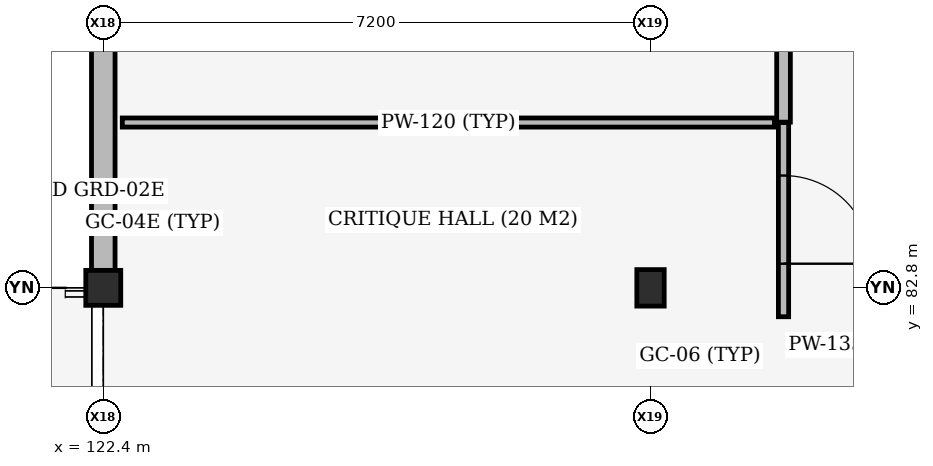
"""IFC4 building model, lengths in metres.
Left out: names, types, materials, properties, quantities, classifications, styles, units other than length and angle.
Written with IfcOpenShell. Run it as: python <this file> out.ifc"""

import sys

from ifc_helpers import new_model, si_unit, direction, frame, frame_2d, origin, origin_2d, place, context, subcontext, project, spatial, rectangle, extrude, element, fill, save


model = new_model("IFC4")
c1 = context("Model", 3, precision=1e-05, world=origin(), true_north=direction((0.0, 1.0)))
c2 = subcontext(c1, "Body", "Model", "MODEL_VIEW")
j1 = project(units=[si_unit("LENGTHUNIT", "METRE"), si_unit("PLANEANGLEUNIT", "RADIAN")], contexts=[c1])
p1 = place(None, origin())
s1 = spatial("IfcSite", under=j1, at=p1, CompositionType="ELEMENT")
p2 = place(p1, origin())
s2 = spatial("IfcBuilding", under=s1, at=p2, CompositionType="ELEMENT")
p3 = place(p2, frame((0.0, 0.0, 9.6)))
s3 = spatial("IfcBuildingStorey", under=s2, at=p3, CompositionType="ELEMENT", Elevation=9.6)
p4 = place(p3, frame((122.4, 82.8, 0.0), z_axis=(0.0, 0.0, 1.0), x_axis=(1.0, 0.0, 0.0)))
e1 = element("IfcColumn", 1, at=p4, inside=s3, PredefinedType="COLUMN", context=c2, shape_type="SweptSolid", body=[
    extrude(rectangle(XDim=0.46, YDim=0.46, at=origin_2d()), origin(), (0.0, 0.0, 1.0), 3.92),
])
p5 = place(p3, frame((129.6, 82.8, 0.0), z_axis=(0.0, 0.0, 1.0), x_axis=(1.0, 0.0, 0.0)))
e2 = element("IfcColumn", 2, at=p5, inside=s3, PredefinedType="COLUMN", context=c2, shape_type="SweptSolid", body=[
    extrude(rectangle(XDim=0.36, YDim=0.48, at=origin_2d()), origin(), (0.0, 0.0, 1.0), 3.92),
])
p6 = place(p3, frame((122.4, 83.022, 0.0), z_axis=(0.0, 0.0, 1.0), x_axis=(0.0, 1.0, 0.0)))
e3 = element("IfcWall", 3, at=p6, inside=s3, PredefinedType="STANDARD", context=c2, shape_type="SweptSolid", body=[
    extrude(rectangle(XDim=3.136, YDim=0.31, at=frame_2d((1.568, 0.0))), origin(), (0.0, 0.0, 1.0), 3.4),
])
p7 = place(p3, frame((131.35, 82.42, 0.0), z_axis=(0.0, 0.0, 1.0), x_axis=(0.0, 1.0, 0.0)))
e4 = element("IfcWall", 4, at=p7, inside=s3, PredefinedType="PARTITIONING", context=c2, shape_type="SweptSolid", body=[
    extrude(rectangle(XDim=2.555, YDim=0.135, at=frame_2d((1.278, 0.0))), origin(), (0.0, 0.0, 1.0), 3.34),
])
p8 = place(p7, frame((0.698, 0.0, 0.0)))
e5 = element("IfcOpeningElement", 5, at=p8, cuts=e4, PredefinedType="OPENING", context=c2, shape_type="SweptSolid", body=[
    extrude(rectangle(XDim=1.16, YDim=2.2, at=frame_2d((0.58, 1.1))), frame((0.0, 0.077, 0.0), z_axis=(0.0, -1.0, 0.0), x_axis=(1.0, 0.0, 0.0)), (0.0, 0.0, 1.0), 0.155),
])
p9 = place(p3, frame((122.65, 84.975, 0.0), z_axis=(0.0, 0.0, 1.0), x_axis=(1.0, 0.0, 0.0)))
e6 = element("IfcWall", 6, at=p9, inside=s3, PredefinedType="PARTITIONING", context=c2, shape_type="SweptSolid", body=[
    extrude(rectangle(XDim=8.58, YDim=0.12, at=frame_2d((4.29, 0.0))), origin(), (0.0, 0.0, 1.0), 3.28),
])
p10 = place(p3, frame((131.35, 84.98, 0.0), z_axis=(0.0, 0.0, 1.0), x_axis=(0.0, 1.0, 0.0)))
e7 = element("IfcWall", 7, at=p10, inside=s3, PredefinedType="PARTITIONING", context=c2, shape_type="SweptSolid", body=[
    extrude(rectangle(XDim=3.215, YDim=0.18, at=frame_2d((1.607, 0.0))), origin(), (0.0, 0.0, 1.0), 3.4),
])
p11 = place(p10, frame((1.133, 0.0, 0.0)))
e8 = element("IfcOpeningElement", 8, at=p11, cuts=e7, PredefinedType="OPENING", context=c2, shape_type="SweptSolid", body=[
    extrude(rectangle(XDim=0.95, YDim=2.15, at=frame_2d((0.475, 1.075))), frame((0.0, 0.1, 0.0), z_axis=(0.0, -1.0, 0.0), x_axis=(1.0, 0.0, 0.0)), (0.0, 0.0, 1.0), 0.2),
])
p12 = place(p8, origin())
e9 = element("IfcDoor", 9, at=p12, inside=s3, OperationType="SINGLE_SWING_RIGHT", PredefinedType="DOOR", context=c2, shape_type="SweptSolid", body=[
    extrude(rectangle(XDim=1.16, YDim=2.2, at=frame_2d((0.58, 1.1))), frame((0.0, 0.025, 0.0), z_axis=(0.0, -1.0, 0.0), x_axis=(1.0, 0.0, 0.0)), (0.0, 0.0, 1.0), 0.05),
])
fill(e5, e9)
save(model, sys.argv[1])
